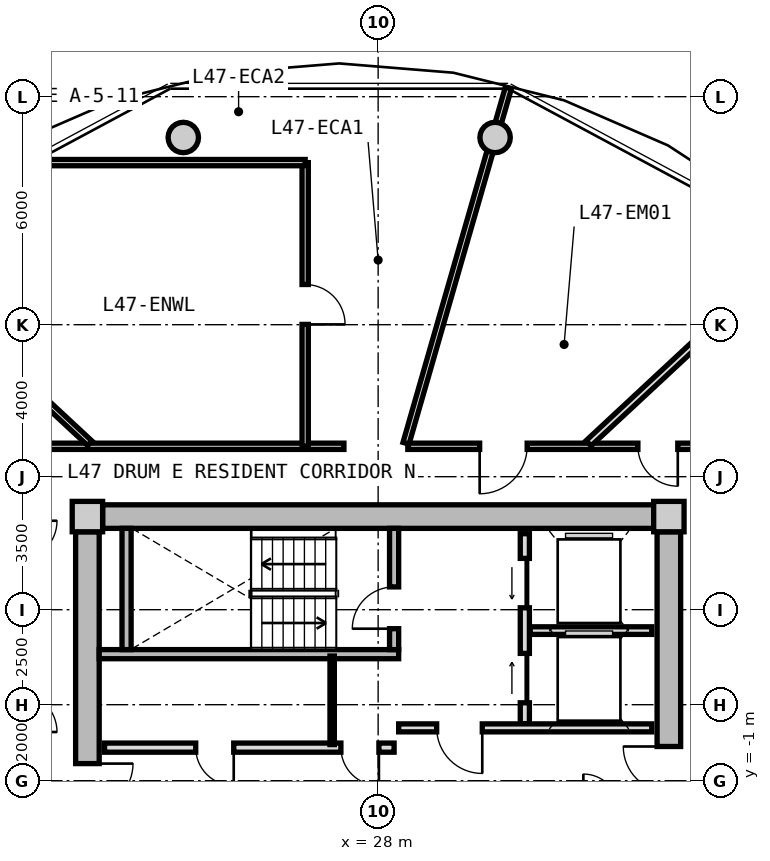
"""IFC4 building model, lengths in metres.
Left out: names, types, materials, properties, quantities, classifications, styles, units other than length and angle.
Written with IfcOpenShell. Run it as: python <this file> out.ifc"""

import sys

from ifc_helpers import new_model, si_unit, direction, frame, frame_2d, origin, origin_2d, place, context, subcontext, project, spatial, rectangle, circle, extrude, source, transform, mapped, element, fill, save


model = new_model("IFC4")
c1 = context("Model", 3, precision=1e-05, world=origin(), true_north=direction((0.0, 1.0)))
c2 = subcontext(c1, "Body", "Model", "MODEL_VIEW")
j1 = project(units=[si_unit("LENGTHUNIT", "METRE"), si_unit("PLANEANGLEUNIT", "RADIAN")], contexts=[c1])
p1 = place(None, origin())
s1 = spatial("IfcSite", under=j1, at=p1, CompositionType="ELEMENT")
p2 = place(p1, origin())
s2 = spatial("IfcBuilding", under=s1, at=p2, CompositionType="ELEMENT")
p3 = place(p2, frame((0.0, 0.0, 152.6)))
s3 = spatial("IfcBuildingStorey", under=s2, at=p3, CompositionType="ELEMENT", Elevation=152.6)
m1 = source(origin(), c2, "Body", "SweptSolid", [
    extrude(rectangle(XDim=0.8, YDim=0.8, at=origin_2d()), origin(), (0.0, 0.0, 1.0), 3.05),
])
for number, where, z_axis, x_axis in (
    (1, (35.65, 5.95, 0.0), (0.0, 0.0, 1.0), (1.0, 0.0, 0.0)),
    (2, (20.35, 5.95, 0.0), (0.0, 0.0, 1.0), (1.0, 0.0, 0.0)),
):
    element("IfcColumn", number, at=place(p3, frame(where, z_axis=z_axis, x_axis=x_axis)), inside=s3, PredefinedType="COLUMN", context=c2, shape_type="MappedRepresentation", body=[
        mapped(m1, transform((0.0, 0.0, 0.0), x_axis=(1.0, 0.0, 0.0), y_axis=(0.0, 1.0, 0.0), z_axis=(0.0, 0.0, 1.0), scale=1.0)),
    ])
m2 = source(origin(), c2, "Body", "SweptSolid", [
    extrude(rectangle(XDim=14.5, YDim=0.62, at=frame_2d((7.25, 0.0))), origin(), (0.0, 0.0, 1.0), 2.81),
])
p4 = place(p3, frame((20.75, 5.95, 0.0), z_axis=(0.0, 0.0, 1.0), x_axis=(1.0, 0.0, 0.0)))
e3 = element("IfcWall", 3, at=p4, inside=s3, PredefinedType="SHEAR", context=c2, shape_type="MappedRepresentation", body=[
    mapped(m2, transform((0.0, 0.0, 0.0), x_axis=(1.0, 0.0, 0.0), y_axis=(0.0, 1.0, 0.0), z_axis=(0.0, 0.0, 1.0), scale=1.0)),
])
m3 = source(origin(), c2, "Body", "SweptSolid", [
    extrude(rectangle(XDim=11.1, YDim=0.62, at=frame_2d((5.55, 0.0))), origin(), (0.0, 0.0, 1.0), 2.81),
])
p5 = place(p3, frame((20.35, -5.55, 0.0), z_axis=(0.0, 0.0, 1.0), x_axis=(0.0, 1.0, 0.0)))
e4 = element("IfcWall", 4, at=p5, inside=s3, PredefinedType="SHEAR", context=c2, shape_type="MappedRepresentation", body=[
    mapped(m3, transform((0.0, 0.0, 0.0), x_axis=(1.0, 0.0, 0.0), y_axis=(0.0, 1.0, 0.0), z_axis=(0.0, 0.0, 1.0), scale=1.0)),
])
p6 = place(p5, frame((3.8, 0.0, 0.0)))
e5 = element("IfcOpeningElement", 5, at=p6, cuts=e4, PredefinedType="OPENING", context=c2, shape_type="SweptSolid", body=[
    extrude(rectangle(XDim=1.2, YDim=2.15, at=frame_2d((0.6, 1.075))), frame((0.0, 0.32, 0.0), z_axis=(0.0, -1.0, 0.0), x_axis=(1.0, 0.0, 0.0)), (0.0, 0.0, 1.0), 0.64),
])
p7 = place(p3, frame((35.65, 5.55, 0.0), z_axis=(0.0, 0.0, 1.0), x_axis=(0.0, -1.0, 0.0)))
e6 = element("IfcWall", 6, at=p7, inside=s3, PredefinedType="SHEAR", context=c2, shape_type="MappedRepresentation", body=[
    mapped(m3, transform((0.0, 0.0, 0.0), x_axis=(1.0, 0.0, 0.0), y_axis=(0.0, 1.0, 0.0), z_axis=(0.0, 0.0, 1.0), scale=1.0)),
])
p8 = place(p7, frame((5.65, 0.0, 0.0)))
e7 = element("IfcOpeningElement", 7, at=p8, cuts=e6, PredefinedType="OPENING", context=c2, shape_type="SweptSolid", body=[
    extrude(rectangle(XDim=1.2, YDim=2.15, at=frame_2d((0.6, 1.075))), frame((0.0, 0.32, 0.0), z_axis=(0.0, -1.0, 0.0), x_axis=(1.0, 0.0, 0.0)), (0.0, 0.0, 1.0), 0.64),
])
p9 = place(p7, frame((9.3, 0.0, 0.0)))
e8 = element("IfcOpeningElement", 8, at=p9, cuts=e6, PredefinedType="OPENING", context=c2, shape_type="SweptSolid", body=[
    extrude(rectangle(XDim=1.0, YDim=2.1, at=frame_2d((0.5, 1.05))), frame((0.0, 0.32, 0.0), z_axis=(0.0, -1.0, 0.0), x_axis=(1.0, 0.0, 0.0)), (0.0, 0.0, 1.0), 0.64),
])
m4 = source(origin(), c2, "Body", "SweptSolid", [
    extrude(circle(Radius=0.4, at=origin_2d()), origin(), (0.0, 0.0, 1.0), 3.05),
])
for number, where, z_axis, x_axis in (
    (9, (31.077, 15.926, 0.0), (0.0, 0.0, 1.0), (1.0, 0.0, 0.0)),
    (10, (22.873, 15.926, 0.0), (0.0, 0.0, 1.0), (1.0, 0.0, 0.0)),
):
    element("IfcColumn", number, at=place(p3, frame(where, z_axis=z_axis, x_axis=x_axis)), inside=s3, PredefinedType="COLUMN", context=c2, shape_type="MappedRepresentation", body=[
        mapped(m4, transform((0.0, 0.0, 0.0), x_axis=(1.0, 0.0, 0.0), y_axis=(0.0, 1.0, 0.0), z_axis=(0.0, 0.0, 1.0), scale=1.0)),
    ])
m5 = source(origin(), c2, "Body", "SweptSolid", [
    extrude(rectangle(XDim=7.88, YDim=0.24, at=frame_2d((3.94, 0.0))), origin(), (0.0, 0.0, 1.0), 2.81),
])
p10 = place(p3, frame((20.66, 2.33, 0.0), z_axis=(0.0, 0.0, 1.0), x_axis=(1.0, 0.0, 0.0)))
e11 = element("IfcWall", 11, at=p10, inside=s3, PredefinedType="PARTITIONING", context=c2, shape_type="MappedRepresentation", body=[
    mapped(m5, transform((0.0, 0.0, 0.0), x_axis=(1.0, 0.0, 0.0), y_axis=(0.0, 1.0, 0.0), z_axis=(0.0, 0.0, 1.0), scale=1.0)),
])
m6 = source(origin(), c2, "Body", "SweptSolid", [
    extrude(rectangle(XDim=3.19, YDim=0.24, at=frame_2d((1.595, 0.0))), origin(), (0.0, 0.0, 1.0), 2.81),
])
p11 = place(p3, frame((21.38, 2.45, 0.0), z_axis=(0.0, 0.0, 1.0), x_axis=(0.0, 1.0, 0.0)))
e12 = element("IfcWall", 12, at=p11, inside=s3, PredefinedType="PARTITIONING", context=c2, shape_type="MappedRepresentation", body=[
    mapped(m6, transform((0.0, 0.0, 0.0), x_axis=(1.0, 0.0, 0.0), y_axis=(0.0, 1.0, 0.0), z_axis=(0.0, 0.0, 1.0), scale=1.0)),
])
p12 = place(p3, frame((28.42, 2.45, 0.0), z_axis=(0.0, 0.0, 1.0), x_axis=(0.0, 1.0, 0.0)))
e13 = element("IfcWall", 13, at=p12, inside=s3, PredefinedType="PARTITIONING", context=c2, shape_type="MappedRepresentation", body=[
    mapped(m6, transform((0.0, 0.0, 0.0), x_axis=(1.0, 0.0, 0.0), y_axis=(0.0, 1.0, 0.0), z_axis=(0.0, 0.0, 1.0), scale=1.0)),
])
p13 = place(p12, frame((0.55, 0.0, 0.0)))
e14 = element("IfcOpeningElement", 14, at=p13, cuts=e13, PredefinedType="OPENING", context=c2, shape_type="SweptSolid", body=[
    extrude(rectangle(XDim=1.1, YDim=2.15, at=frame_2d((0.55, 1.075))), frame((0.0, 0.13, 0.0), z_axis=(0.0, -1.0, 0.0), x_axis=(1.0, 0.0, 0.0)), (0.0, 0.0, 1.0), 0.26),
])
m7 = source(origin(), c2, "Body", "SweptSolid", [
    extrude(rectangle(XDim=5.0, YDim=0.24, at=frame_2d((2.5, 0.0))), origin(), (0.0, 0.0, 1.0), 2.795),
])
p14 = place(p3, frame((31.86, 0.5, 0.0), z_axis=(0.0, 0.0, 1.0), x_axis=(0.0, 1.0, 0.0)))
e15 = element("IfcWall", 15, at=p14, inside=s3, PredefinedType="PARTITIONING", context=c2, shape_type="MappedRepresentation", body=[
    mapped(m7, transform((0.0, 0.0, 0.0), x_axis=(1.0, 0.0, 0.0), y_axis=(0.0, 1.0, 0.0), z_axis=(0.0, 0.0, 1.0), scale=1.0)),
])
p15 = place(p14, frame((3.05, 0.0, 0.0)))
e16 = element("IfcOpeningElement", 16, at=p15, cuts=e15, PredefinedType="OPENING", context=c2, shape_type="SweptSolid", body=[
    extrude(rectangle(XDim=1.3, YDim=2.2, at=frame_2d((0.65, 1.1))), frame((0.0, 0.13, 0.0), z_axis=(0.0, -1.0, 0.0), x_axis=(1.0, 0.0, 0.0)), (0.0, 0.0, 1.0), 0.26),
])
p16 = place(p14, frame((0.55, 0.0, 0.0)))
e17 = element("IfcOpeningElement", 17, at=p16, cuts=e15, PredefinedType="OPENING", context=c2, shape_type="SweptSolid", body=[
    extrude(rectangle(XDim=1.3, YDim=2.2, at=frame_2d((0.65, 1.1))), frame((0.0, 0.13, 0.0), z_axis=(0.0, -1.0, 0.0), x_axis=(1.0, 0.0, 0.0)), (0.0, 0.0, 1.0), 0.26),
])
m8 = source(origin(), c2, "Body", "SweptSolid", [
    extrude(rectangle(XDim=3.2, YDim=0.2, at=frame_2d((1.6, 0.0))), origin(), (0.0, 0.0, 1.0), 2.795),
])
p17 = place(p3, frame((32.0, 2.95, 0.0), z_axis=(0.0, 0.0, 1.0), x_axis=(1.0, 0.0, 0.0)))
e18 = element("IfcWall", 18, at=p17, inside=s3, PredefinedType="PARTITIONING", context=c2, shape_type="MappedRepresentation", body=[
    mapped(m8, transform((0.0, 0.0, 0.0), x_axis=(1.0, 0.0, 0.0), y_axis=(0.0, 1.0, 0.0), z_axis=(0.0, 0.0, 1.0), scale=1.0)),
])
m9 = source(origin(), c2, "Body", "SweptSolid", [
    extrude(rectangle(XDim=6.66, YDim=0.21, at=frame_2d((3.33, 0.0))), origin(), (0.0, 0.0, 1.0), 2.795),
])
p18 = place(p3, frame((28.54, 0.39, 0.0), z_axis=(0.0, 0.0, 1.0), x_axis=(1.0, 0.0, 0.0)))
e19 = element("IfcWall", 19, at=p18, inside=s3, PredefinedType="PARTITIONING", context=c2, shape_type="MappedRepresentation", body=[
    mapped(m9, transform((0.0, 0.0, 0.0), x_axis=(1.0, 0.0, 0.0), y_axis=(0.0, 1.0, 0.0), z_axis=(0.0, 0.0, 1.0), scale=1.0)),
])
p19 = place(p18, frame((1.0, 0.0, 0.0)))
e20 = element("IfcOpeningElement", 20, at=p19, cuts=e19, PredefinedType="OPENING", context=c2, shape_type="SweptSolid", body=[
    extrude(rectangle(XDim=1.2, YDim=2.15, at=frame_2d((0.6, 1.075))), frame((0.0, 0.115, 0.0), z_axis=(0.0, -1.0, 0.0), x_axis=(1.0, 0.0, 0.0)), (0.0, 0.0, 1.0), 0.23),
])
m10 = source(origin(), c2, "Body", "SweptSolid", [
    extrude(rectangle(XDim=7.62, YDim=0.24, at=frame_2d((3.81, 0.0))), origin(), (0.0, 0.0, 1.0), 2.795),
])
p20 = place(p3, frame((20.8, -0.13, 0.0), z_axis=(0.0, 0.0, 1.0), x_axis=(1.0, 0.0, 0.0)))
e21 = element("IfcWall", 21, at=p20, inside=s3, PredefinedType="PARTITIONING", context=c2, shape_type="MappedRepresentation", body=[
    mapped(m10, transform((0.0, 0.0, 0.0), x_axis=(1.0, 0.0, 0.0), y_axis=(0.0, 1.0, 0.0), z_axis=(0.0, 0.0, 1.0), scale=1.0)),
])
p21 = place(p20, frame((6.22, 0.0, 0.0)))
e22 = element("IfcOpeningElement", 22, at=p21, cuts=e21, PredefinedType="OPENING", context=c2, shape_type="SweptSolid", body=[
    extrude(rectangle(XDim=1.0, YDim=2.1, at=frame_2d((0.5, 1.05))), frame((0.0, 0.13, 0.0), z_axis=(0.0, -1.0, 0.0), x_axis=(1.0, 0.0, 0.0)), (0.0, 0.0, 1.0), 0.26),
])
p22 = place(p20, frame((2.4, 0.0, 0.0)))
e23 = element("IfcOpeningElement", 23, at=p22, cuts=e21, PredefinedType="OPENING", context=c2, shape_type="SweptSolid", body=[
    extrude(rectangle(XDim=1.0, YDim=2.1, at=frame_2d((0.5, 1.05))), frame((0.0, 0.13, 0.0), z_axis=(0.0, -1.0, 0.0), x_axis=(1.0, 0.0, 0.0)), (0.0, 0.0, 1.0), 0.26),
])
m11 = source(origin(), c2, "Body", "SweptSolid", [
    extrude(rectangle(XDim=2.33, YDim=0.115, at=frame_2d((1.165, 0.0))), origin(), (0.0, 0.0, 1.0), 2.795),
])
p23 = place(p3, frame((26.79, -0.05, 0.0), z_axis=(0.0, 0.0, 1.0), x_axis=(0.0, 1.0, 0.0)))
e24 = element("IfcWall", 24, at=p23, inside=s3, PredefinedType="PARTITIONING", context=c2, shape_type="MappedRepresentation", body=[
    mapped(m11, transform((0.0, 0.0, 0.0), x_axis=(1.0, 0.0, 0.0), y_axis=(0.0, 1.0, 0.0), z_axis=(0.0, 0.0, 1.0), scale=1.0)),
])
m12 = source(origin(), c2, "Body", "SweptSolid", [
    extrude(rectangle(XDim=8.6, YDim=0.165, at=frame_2d((4.3, 0.0))), origin(), (0.0, 0.0, 1.0), 2.795),
])
p24 = place(p3, frame((18.5, 7.8, 0.0), z_axis=(0.0, 0.0, 1.0), x_axis=(1.0, 0.0, 0.0)))
e25 = element("IfcWall", 25, at=p24, inside=s3, PredefinedType="PARTITIONING", context=c2, shape_type="MappedRepresentation", body=[
    mapped(m12, transform((0.0, 0.0, 0.0), x_axis=(1.0, 0.0, 0.0), y_axis=(0.0, 1.0, 0.0), z_axis=(0.0, 0.0, 1.0), scale=1.0)),
])
m13 = source(origin(), c2, "Body", "SweptSolid", [
    extrude(rectangle(XDim=8.719, YDim=0.165, at=frame_2d((4.36, 0.0))), origin(), (0.0, 0.0, 1.0), 2.795),
])
p25 = place(p3, frame((28.781, 7.8, 0.0), z_axis=(0.0, 0.0, 1.0), x_axis=(1.0, 0.0, 0.0)))
e26 = element("IfcWall", 26, at=p25, inside=s3, PredefinedType="PARTITIONING", context=c2, shape_type="MappedRepresentation", body=[
    mapped(m13, transform((0.0, 0.0, 0.0), x_axis=(1.0, 0.0, 0.0), y_axis=(0.0, 1.0, 0.0), z_axis=(0.0, 0.0, 1.0), scale=1.0)),
])
p26 = place(p25, frame((6.054, 0.0, 0.0)))
e27 = element("IfcOpeningElement", 27, at=p26, cuts=e26, PredefinedType="OPENING", context=c2, shape_type="SweptSolid", body=[
    extrude(rectangle(XDim=1.05, YDim=2.15, at=frame_2d((0.525, 1.075))), frame((0.0, 0.093, 0.0), z_axis=(0.0, -1.0, 0.0), x_axis=(1.0, 0.0, 0.0)), (0.0, 0.0, 1.0), 0.185),
])
p27 = place(p25, frame((1.891, 0.0, 0.0)))
e28 = element("IfcOpeningElement", 28, at=p27, cuts=e26, PredefinedType="OPENING", context=c2, shape_type="SweptSolid", body=[
    extrude(rectangle(XDim=1.25, YDim=2.2, at=frame_2d((0.625, 1.1))), frame((0.0, 0.093, 0.0), z_axis=(0.0, -1.0, 0.0), x_axis=(1.0, 0.0, 0.0)), (0.0, 0.0, 1.0), 0.185),
])
m14 = source(origin(), c2, "Body", "SweptSolid", [
    extrude(rectangle(XDim=9.73, YDim=0.165, at=frame_2d((4.865, 0.0))), origin(), (0.0, 0.0, 1.0), 2.345),
])
p28 = place(p3, frame((28.733, 7.88, 0.0), z_axis=(0.0, 0.0, 1.0), x_axis=(0.27679492614, 0.960929013436, 0.0)))
e29 = element("IfcWall", 29, at=p28, inside=s3, PredefinedType="PARTITIONING", context=c2, shape_type="MappedRepresentation", body=[
    mapped(m14, transform((0.0, 0.0, 0.0), x_axis=(1.0, 0.0, 0.0), y_axis=(0.0, 1.0, 0.0), z_axis=(0.0, 0.0, 1.0), scale=1.0)),
])
m15 = source(origin(), c2, "Body", "SweptSolid", [
    extrude(rectangle(XDim=7.648, YDim=0.165, at=frame_2d((3.824, 0.0))), origin(), (0.0, 0.0, 1.0), 2.345),
])
p29 = place(p3, frame((20.413, 7.88, 0.0), z_axis=(0.0, 0.0, 1.0), x_axis=(-0.732182665826, 0.681108320213, 0.0)))
e30 = element("IfcWall", 30, at=p29, inside=s3, PredefinedType="PARTITIONING", context=c2, shape_type="MappedRepresentation", body=[
    mapped(m15, transform((0.0, 0.0, 0.0), x_axis=(1.0, 0.0, 0.0), y_axis=(0.0, 1.0, 0.0), z_axis=(0.0, 0.0, 1.0), scale=1.0)),
])
m16 = source(origin(), c2, "Body", "SweptSolid", [
    extrude(rectangle(XDim=7.465, YDim=0.165, at=frame_2d((3.733, 0.0))), origin(), (0.0, 0.0, 1.0), 2.795),
])
p30 = place(p3, frame((26.08, 7.8, 0.0), z_axis=(0.0, 0.0, 1.0), x_axis=(0.0, 1.0, 0.0)))
e31 = element("IfcWall", 31, at=p30, inside=s3, PredefinedType="PARTITIONING", context=c2, shape_type="MappedRepresentation", body=[
    mapped(m16, transform((0.0, 0.0, 0.0), x_axis=(1.0, 0.0, 0.0), y_axis=(0.0, 1.0, 0.0), z_axis=(0.0, 0.0, 1.0), scale=1.0)),
])
p31 = place(p30, frame((3.208, 0.0, 0.0)))
e32 = element("IfcOpeningElement", 32, at=p31, cuts=e31, PredefinedType="OPENING", context=c2, shape_type="SweptSolid", body=[
    extrude(rectangle(XDim=1.05, YDim=2.15, at=frame_2d((0.525, 1.075))), frame((0.0, 0.093, 0.0), z_axis=(0.0, -1.0, 0.0), x_axis=(1.0, 0.0, 0.0)), (0.0, 0.0, 1.0), 0.185),
])
m17 = source(origin(), c2, "Body", "SweptSolid", [
    extrude(rectangle(XDim=7.473, YDim=0.165, at=frame_2d((3.737, 0.0))), origin(), (0.0, 0.0, 1.0), 2.795),
])
p32 = place(p3, frame((18.607, 15.265, 0.0), z_axis=(0.0, 0.0, 1.0), x_axis=(1.0, 0.0, 0.0)))
e33 = element("IfcWall", 33, at=p32, inside=s3, PredefinedType="PARTITIONING", context=c2, shape_type="MappedRepresentation", body=[
    mapped(m17, transform((0.0, 0.0, 0.0), x_axis=(1.0, 0.0, 0.0), y_axis=(0.0, 1.0, 0.0), z_axis=(0.0, 0.0, 1.0), scale=1.0)),
])
m18 = source(origin(), c2, "Body", "SweptSolid", [
    extrude(rectangle(XDim=7.648, YDim=0.19, at=frame_2d((3.824, 0.0))), origin(), (0.0, 0.0, 1.0), 2.345),
])
p33 = place(p3, frame((33.538, 7.88, 0.0), z_axis=(0.0, 0.0, 1.0), x_axis=(0.732167856666, 0.681124239522, 0.0)))
e34 = element("IfcWall", 34, at=p33, inside=s3, PredefinedType="PARTITIONING", context=c2, shape_type="MappedRepresentation", body=[
    mapped(m18, transform((0.0, 0.0, 0.0), x_axis=(1.0, 0.0, 0.0), y_axis=(0.0, 1.0, 0.0), z_axis=(0.0, 0.0, 1.0), scale=1.0)),
])
m19 = source(origin(), c2, "Body", "SweptSolid", [
    extrude(rectangle(XDim=1.1, YDim=2.15, at=frame_2d((0.55, 1.075))), frame((0.0, 0.025, 0.0), z_axis=(0.0, -1.0, 0.0), x_axis=(1.0, 0.0, 0.0)), (0.0, 0.0, 1.0), 0.05),
])
p34 = place(p13, origin())
e35 = element("IfcDoor", 35, at=p34, inside=s3, OperationType="SINGLE_SWING_LEFT", PredefinedType="DOOR", context=c2, shape_type="MappedRepresentation", body=[
    mapped(m19, transform((0.0, 0.0, 0.0), x_axis=(1.0, 0.0, 0.0), y_axis=(0.0, 1.0, 0.0), z_axis=(0.0, 0.0, 1.0), scale=1.0)),
])
fill(e14, e35)
m20 = source(origin(), c2, "Body", "SweptSolid", [
    extrude(rectangle(XDim=1.3, YDim=2.2, at=frame_2d((0.65, 1.1))), frame((0.0, 0.025, 0.0), z_axis=(0.0, -1.0, 0.0), x_axis=(1.0, 0.0, 0.0)), (0.0, 0.0, 1.0), 0.05),
])
p35 = place(p15, origin())
e36 = element("IfcDoor", 36, at=p35, inside=s3, OperationType="SLIDING_TO_LEFT", PredefinedType="DOOR", context=c2, shape_type="MappedRepresentation", body=[
    mapped(m20, transform((0.0, 0.0, 0.0), x_axis=(1.0, 0.0, 0.0), y_axis=(0.0, 1.0, 0.0), z_axis=(0.0, 0.0, 1.0), scale=1.0)),
])
fill(e16, e36)
p36 = place(p16, origin())
e37 = element("IfcDoor", 37, at=p36, inside=s3, OperationType="SLIDING_TO_RIGHT", PredefinedType="DOOR", context=c2, shape_type="MappedRepresentation", body=[
    mapped(m20, transform((0.0, 0.0, 0.0), x_axis=(1.0, 0.0, 0.0), y_axis=(0.0, 1.0, 0.0), z_axis=(0.0, 0.0, 1.0), scale=1.0)),
])
fill(e17, e37)
m21 = source(origin(), c2, "Body", "SweptSolid", [
    extrude(rectangle(XDim=1.2, YDim=2.15, at=frame_2d((0.6, 1.075))), frame((0.0, 0.025, 0.0), z_axis=(0.0, -1.0, 0.0), x_axis=(1.0, 0.0, 0.0)), (0.0, 0.0, 1.0), 0.05),
])
p37 = place(p19, frame((1.2, 0.0, 0.0), z_axis=(0.0, 0.0, 1.0), x_axis=(-1.0, 0.0, 0.0)))
e38 = element("IfcDoor", 38, at=p37, inside=s3, OperationType="SINGLE_SWING_LEFT", PredefinedType="DOOR", context=c2, shape_type="MappedRepresentation", body=[
    mapped(m21, transform((0.0, 0.0, 0.0), x_axis=(1.0, 0.0, 0.0), y_axis=(0.0, 1.0, 0.0), z_axis=(0.0, 0.0, 1.0), scale=1.0)),
])
fill(e20, e38)
p38 = place(p6, frame((1.2, 0.0, 0.0), z_axis=(0.0, 0.0, 1.0), x_axis=(-1.0, 0.0, 0.0)))
e39 = element("IfcDoor", 39, at=p38, inside=s3, OperationType="SINGLE_SWING_LEFT", PredefinedType="DOOR", context=c2, shape_type="MappedRepresentation", body=[
    mapped(m21, transform((0.0, 0.0, 0.0), x_axis=(1.0, 0.0, 0.0), y_axis=(0.0, 1.0, 0.0), z_axis=(0.0, 0.0, 1.0), scale=1.0)),
])
fill(e5, e39)
p39 = place(p8, frame((1.2, 0.0, 0.0), z_axis=(0.0, 0.0, 1.0), x_axis=(-1.0, 0.0, 0.0)))
e40 = element("IfcDoor", 40, at=p39, inside=s3, OperationType="SINGLE_SWING_RIGHT", PredefinedType="DOOR", context=c2, shape_type="MappedRepresentation", body=[
    mapped(m21, transform((0.0, 0.0, 0.0), x_axis=(1.0, 0.0, 0.0), y_axis=(0.0, 1.0, 0.0), z_axis=(0.0, 0.0, 1.0), scale=1.0)),
])
fill(e7, e40)
m22 = source(origin(), c2, "Body", "SweptSolid", [
    extrude(rectangle(XDim=1.0, YDim=2.1, at=frame_2d((0.5, 1.05))), frame((0.0, 0.025, 0.0), z_axis=(0.0, -1.0, 0.0), x_axis=(1.0, 0.0, 0.0)), (0.0, 0.0, 1.0), 0.05),
])
p40 = place(p21, frame((1.0, 0.0, 0.0), z_axis=(0.0, 0.0, 1.0), x_axis=(-1.0, 0.0, 0.0)))
e41 = element("IfcDoor", 41, at=p40, inside=s3, OperationType="SINGLE_SWING_LEFT", PredefinedType="DOOR", context=c2, shape_type="MappedRepresentation", body=[
    mapped(m22, transform((0.0, 0.0, 0.0), x_axis=(1.0, 0.0, 0.0), y_axis=(0.0, 1.0, 0.0), z_axis=(0.0, 0.0, 1.0), scale=1.0)),
])
fill(e22, e41)
p41 = place(p22, frame((1.0, 0.0, 0.0), z_axis=(0.0, 0.0, 1.0), x_axis=(-1.0, 0.0, 0.0)))
e42 = element("IfcDoor", 42, at=p41, inside=s3, OperationType="SINGLE_SWING_LEFT", PredefinedType="DOOR", context=c2, shape_type="MappedRepresentation", body=[
    mapped(m22, transform((0.0, 0.0, 0.0), x_axis=(1.0, 0.0, 0.0), y_axis=(0.0, 1.0, 0.0), z_axis=(0.0, 0.0, 1.0), scale=1.0)),
])
fill(e23, e42)
m23 = source(origin(), c2, "Body", "SweptSolid", [
    extrude(rectangle(XDim=1.05, YDim=2.15, at=frame_2d((0.525, 1.075))), frame((0.0, 0.025, 0.0), z_axis=(0.0, -1.0, 0.0), x_axis=(1.0, 0.0, 0.0)), (0.0, 0.0, 1.0), 0.05),
])
p42 = place(p31, frame((1.05, 0.0, 0.0), z_axis=(0.0, 0.0, 1.0), x_axis=(-1.0, 0.0, 0.0)))
e43 = element("IfcDoor", 43, at=p42, inside=s3, OperationType="SINGLE_SWING_RIGHT", PredefinedType="DOOR", context=c2, shape_type="MappedRepresentation", body=[
    mapped(m23, transform((0.0, 0.0, 0.0), x_axis=(1.0, 0.0, 0.0), y_axis=(0.0, 1.0, 0.0), z_axis=(0.0, 0.0, 1.0), scale=1.0)),
])
fill(e32, e43)
p43 = place(p26, frame((1.05, 0.0, 0.0), z_axis=(0.0, 0.0, 1.0), x_axis=(-1.0, 0.0, 0.0)))
e44 = element("IfcDoor", 44, at=p43, inside=s3, OperationType="SINGLE_SWING_LEFT", PredefinedType="DOOR", context=c2, shape_type="MappedRepresentation", body=[
    mapped(m23, transform((0.0, 0.0, 0.0), x_axis=(1.0, 0.0, 0.0), y_axis=(0.0, 1.0, 0.0), z_axis=(0.0, 0.0, 1.0), scale=1.0)),
])
fill(e27, e44)
m24 = source(origin(), c2, "Body", "SweptSolid", [
    extrude(rectangle(XDim=1.25, YDim=2.2, at=frame_2d((0.625, 1.1))), frame((0.0, 0.025, 0.0), z_axis=(0.0, -1.0, 0.0), x_axis=(1.0, 0.0, 0.0)), (0.0, 0.0, 1.0), 0.05),
])
p44 = place(p27, frame((1.25, 0.0, 0.0), z_axis=(0.0, 0.0, 1.0), x_axis=(-1.0, 0.0, 0.0)))
e45 = element("IfcDoor", 45, at=p44, inside=s3, OperationType="SINGLE_SWING_RIGHT", PredefinedType="DOOR", context=c2, shape_type="MappedRepresentation", body=[
    mapped(m24, transform((0.0, 0.0, 0.0), x_axis=(1.0, 0.0, 0.0), y_axis=(0.0, 1.0, 0.0), z_axis=(0.0, 0.0, 1.0), scale=1.0)),
])
fill(e28, e45)
save(model, sys.argv[1])
